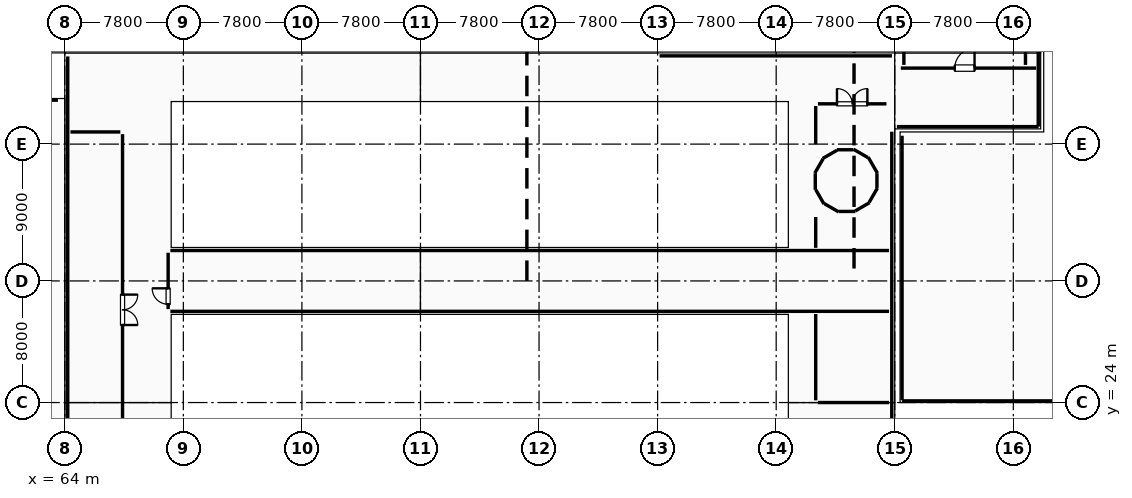
"""IFC4 building model, lengths in metres.
Left out: names, types, materials, properties, quantities, classifications, styles, units other than length and angle.
Written with IfcOpenShell. Run it as: python <this file> out.ifc"""

import sys

from ifc_helpers import new_model, si_unit, direction, frame, frame_2d, origin, origin_2d, place, context, subcontext, project, spatial, rectangle, i_section, extrude, element, fill, save


model = new_model("IFC4")
c1 = context("Model", 3, precision=1e-05, world=origin(), true_north=direction((0.0, 1.0)))
c2 = subcontext(c1, "Body", "Model", "MODEL_VIEW")
j1 = project(units=[si_unit("LENGTHUNIT", "METRE"), si_unit("PLANEANGLEUNIT", "RADIAN")], contexts=[c1])
p1 = place(None, origin())
s1 = spatial("IfcSite", under=j1, at=p1, CompositionType="ELEMENT")
p2 = place(p1, origin())
s2 = spatial("IfcBuilding", under=s1, at=p2, CompositionType="ELEMENT")
p3 = place(p2, frame((0.0, 0.0, 19.8)))
s3 = spatial("IfcBuildingStorey", under=s2, at=p3, CompositionType="ELEMENT", Elevation=19.8)
p4 = place(p3, frame((126.4, 41.0, 0.0), z_axis=(0.0, 0.0, 1.0), x_axis=(1.0, 0.0, 0.0)))
e1 = element("IfcColumn", 1, at=p4, inside=s3, PredefinedType="COLUMN", context=c2, shape_type="SweptSolid", body=[
    extrude(rectangle(XDim=0.75, YDim=0.75, at=origin_2d()), origin(), (0.0, 0.0, 1.0), 4.23),
])
for number, where, z_axis, x_axis in (
    (2, (64.0, 47.0, 0.0), (0.0, 0.0, 1.0), (1.0, 0.0, 0.0)),
    (3, (71.8, 47.0, 0.0), (0.0, 0.0, 1.0), (1.0, 0.0, 0.0)),
    (4, (79.6, 47.0, 0.0), (0.0, 0.0, 1.0), (1.0, 0.0, 0.0)),
    (5, (87.4, 47.0, 0.0), (0.0, 0.0, 1.0), (1.0, 0.0, 0.0)),
    (6, (95.2, 47.0, 0.0), (0.0, 0.0, 1.0), (1.0, 0.0, 0.0)),
    (7, (103.0, 47.0, 0.0), (0.0, 0.0, 1.0), (1.0, 0.0, 0.0)),
):
    element("IfcColumn", number, at=place(p3, frame(where, z_axis=z_axis, x_axis=x_axis)), inside=s3, PredefinedType="COLUMN", context=c2, shape_type="SweptSolid", body=[
        extrude(i_section(OverallWidth=0.25, OverallDepth=0.45, WebThickness=0.011, FlangeThickness=0.014, FilletRadius=0.015, at=origin_2d()), origin(), (0.0, 0.0, 1.0), 4.5),
    ])
p5 = place(p3, frame((70.0, 41.0, 0.0), z_axis=(0.0, 0.0, 1.0), x_axis=(1.0, 0.0, 0.0)))
e8 = element("IfcColumn", 8, at=p5, inside=s3, PredefinedType="COLUMN", context=c2, shape_type="SweptSolid", body=[
    extrude(rectangle(XDim=1.2, YDim=1.2, at=origin_2d()), origin(), (0.0, 0.0, 1.0), 4.5),
])
for number, where, z_axis, x_axis in (
    (9, (79.6, 41.0, 0.0), (0.0, 0.0, 1.0), (1.0, 0.0, 0.0)),
    (10, (87.4, 41.0, 0.0), (0.0, 0.0, 1.0), (1.0, 0.0, 0.0)),
    (11, (95.2, 41.0, 0.0), (0.0, 0.0, 1.0), (1.0, 0.0, 0.0)),
    (12, (103.0, 41.0, 0.0), (0.0, 0.0, 1.0), (1.0, 0.0, 0.0)),
):
    element("IfcColumn", number, at=place(p3, frame(where, z_axis=z_axis, x_axis=x_axis)), inside=s3, PredefinedType="COLUMN", context=c2, shape_type="SweptSolid", body=[
        extrude(rectangle(XDim=1.05, YDim=1.05, at=origin_2d()), origin(), (0.0, 0.0, 1.0), 4.5),
    ])
p6 = place(p3, frame((112.6, 41.0, 0.0), z_axis=(0.0, 0.0, 1.0), x_axis=(1.0, 0.0, 0.0)))
e13 = element("IfcColumn", 13, at=p6, inside=s3, PredefinedType="COLUMN", context=c2, shape_type="SweptSolid", body=[
    extrude(rectangle(XDim=1.2, YDim=1.2, at=origin_2d()), origin(), (0.0, 0.0, 1.0), 4.5),
])
p7 = place(p3, frame((103.129, 46.805, 0.0), z_axis=(0.0, 0.0, 1.0), x_axis=(1.0, 0.0, 0.0)))
e14 = element("IfcWall", 14, at=p7, inside=s3, PredefinedType="STANDARD", context=c2, shape_type="SweptSolid", body=[
    extrude(rectangle(XDim=15.286, YDim=0.35, at=frame_2d((7.643, 0.0))), origin(), (0.0, 0.0, 1.0), 1.25),
])
p8 = place(p3, frame((128.04, 55.25, 0.0), z_axis=(0.0, 0.0, 1.0), x_axis=(0.0, -1.0, 0.0)))
e15 = element("IfcWall", 15, at=p8, inside=s3, PredefinedType="STANDARD", context=c2, shape_type="SweptSolid", body=[
    extrude(rectangle(XDim=13.1, YDim=0.28, at=frame_2d((6.55, 0.0))), origin(), (0.0, 0.0, 1.0), 4.28),
])
p9 = place(p8, frame((5.5, 0.0, 0.95)))
e16 = element("IfcOpeningElement", 16, at=p9, cuts=e15, PredefinedType="OPENING", context=c2, shape_type="SweptSolid", body=[
    extrude(rectangle(XDim=2.1, YDim=1.5, at=frame_2d((1.05, 0.75))), frame((0.0, 0.15, 0.0), z_axis=(0.0, -1.0, 0.0), x_axis=(1.0, 0.0, 0.0)), (0.0, 0.0, 1.0), 0.3),
])
p10 = place(p3, frame((128.06, 42.15, 0.0), z_axis=(0.0, 0.0, 1.0), x_axis=(-1.0, 0.0, 0.0)))
e17 = element("IfcWall", 17, at=p10, inside=s3, PredefinedType="ELEMENTEDWALL", context=c2, shape_type="SweptSolid", body=[
    extrude(rectangle(XDim=9.32, YDim=0.26, at=frame_2d((4.66, 0.0))), origin(), (0.0, 0.0, 1.0), 4.28),
])
p11 = place(p10, frame((3.61, 0.0, 0.95)))
e18 = element("IfcOpeningElement", 18, at=p11, cuts=e17, PredefinedType="OPENING", context=c2, shape_type="SweptSolid", body=[
    extrude(rectangle(XDim=2.1, YDim=1.8, at=frame_2d((1.05, 0.9))), frame((0.0, 0.14, 0.0), z_axis=(0.0, -1.0, 0.0), x_axis=(1.0, 0.0, 0.0)), (0.0, 0.0, 1.0), 0.28),
])
p12 = place(p3, frame((118.405, 41.815, 0.0), z_axis=(0.0, 0.0, 1.0), x_axis=(0.0, -1.0, 0.0)))
e19 = element("IfcWall", 19, at=p12, inside=s3, PredefinedType="STANDARD", context=c2, shape_type="SweptSolid", body=[
    extrude(rectangle(XDim=31.63, YDim=0.35, at=frame_2d((15.815, 0.0))), origin(), (0.0, 0.0, 1.0), 1.25),
])
p13 = place(p3, frame((64.195, 10.185, 0.0), z_axis=(0.0, 0.0, 1.0), x_axis=(0.0, 1.0, 0.0)))
e20 = element("IfcWall", 20, at=p13, inside=s3, PredefinedType="STANDARD", context=c2, shape_type="SweptSolid", body=[
    extrude(rectangle(XDim=36.582, YDim=0.35, at=frame_2d((18.291, 0.0))), origin(), (0.0, 0.0, 1.0), 1.25),
])
p14 = place(p3, frame((63.876, 47.17, 0.0), z_axis=(0.0, 0.0, 1.0), x_axis=(-1.0, 0.0, 0.0)))
e21 = element("IfcWall", 21, at=p14, inside=s3, PredefinedType="STANDARD", context=c2, shape_type="SweptSolid", body=[
    extrude(rectangle(XDim=9.716, YDim=0.3, at=frame_2d((4.858, 0.0))), origin(), (0.0, 0.0, 1.0), 4.25),
])
p15 = place(p14, frame((3.826, 0.0, 0.95)))
e22 = element("IfcOpeningElement", 22, at=p15, cuts=e21, PredefinedType="OPENING", context=c2, shape_type="SweptSolid", body=[
    extrude(rectangle(XDim=2.1, YDim=2.1, at=frame_2d((1.05, 1.05))), frame((0.0, 0.16, 0.0), z_axis=(0.0, -1.0, 0.0), x_axis=(1.0, 0.0, 0.0)), (0.0, 0.0, 1.0), 0.32),
])
p16 = place(p3, frame((40.45, 43.89, 0.0), z_axis=(0.0, 0.0, 1.0), x_axis=(1.0, 0.0, 0.0)))
e23 = element("IfcWall", 23, at=p16, inside=s3, PredefinedType="PARAPET", context=c2, shape_type="SweptSolid", body=[
    extrude(rectangle(XDim=23.1, YDim=0.18, at=frame_2d((11.55, 0.0))), origin(), (0.0, 0.0, 1.0), 1.15),
])
p17 = place(p3, frame((135.2, 24.11, 0.0), z_axis=(0.0, 0.0, 1.0), x_axis=(-1.0, 0.0, 0.0)))
e24 = element("IfcWall", 24, at=p17, inside=s3, PredefinedType="PARAPET", context=c2, shape_type="SweptSolid", body=[
    extrude(rectangle(XDim=16.12, YDim=0.18, at=frame_2d((8.06, 0.0))), origin(), (0.0, 0.0, 1.0), 1.15),
])
p18 = place(p3, frame((119.08, 24.15, 0.0), z_axis=(0.0, 0.0, 1.0), x_axis=(0.0, 1.0, 0.0)))
e25 = element("IfcWall", 25, at=p18, inside=s3, PredefinedType="PARAPET", context=c2, shape_type="SweptSolid", body=[
    extrude(rectangle(XDim=17.4, YDim=0.22, at=frame_2d((8.7, 0.0))), origin(), (0.0, 0.0, 1.0), 1.15),
])
p19 = place(p3, frame((119.0, 46.0, 0.0), z_axis=(0.0, 0.0, 1.0), x_axis=(1.0, 0.0, 0.0)))
e26 = element("IfcWall", 26, at=p19, inside=s3, PredefinedType="SHEAR", context=c2, shape_type="SweptSolid", body=[
    extrude(rectangle(XDim=8.896, YDim=0.4, at=frame_2d((4.448, 0.0))), origin(), (0.0, 0.0, 1.0), 4.28),
])
p20 = place(p19, frame((3.55, 0.0, 0.0)))
e27 = element("IfcOpeningElement", 27, at=p20, cuts=e26, PredefinedType="OPENING", context=c2, shape_type="SweptSolid", body=[
    extrude(rectangle(XDim=1.3, YDim=2.15, at=frame_2d((0.65, 1.075))), frame((0.0, 0.21, 0.0), z_axis=(0.0, -1.0, 0.0), x_axis=(1.0, 0.0, 0.0)), (0.0, 0.0, 1.0), 0.42),
])
for number, where, z_axis, x_axis in (
    (28, (127.2, 46.21, 0.0), (0.0, 0.0, 1.0), (0.0, 1.0, 0.0)),
    (29, (119.2, 54.59, 0.0), (0.0, 0.0, 1.0), (0.0, -1.0, 0.0)),
):
    element("IfcWall", number, at=place(p3, frame(where, z_axis=z_axis, x_axis=x_axis)), inside=s3, PredefinedType="SHEAR", context=c2, shape_type="SweptSolid", body=[
        extrude(rectangle(XDim=8.38, YDim=0.4, at=frame_2d((4.19, 0.0))), origin(), (0.0, 0.0, 1.0), 4.28),
    ])
p21 = place(p3, frame((117.461, 39.086, 0.0), z_axis=(0.0, 0.0, 1.0), x_axis=(-0.500080723117, 0.865978793255, 0.0)))
e30 = element("IfcWall", 30, at=p21, inside=s3, PredefinedType="SHEAR", context=c2, shape_type="SweptSolid", body=[
    extrude(rectangle(XDim=1.219, YDim=0.35, at=frame_2d((0.609, 0.0))), origin(), (0.0, 0.0, 1.0), 4.5),
])
for number, where, z_axis, x_axis in (
    (31, (116.833, 40.115, 0.0), (0.0, 0.0, 1.0), (-0.866, 0.5, 0.0)),
    (32, (115.884, 40.628, 0.0), (0.0, 0.0, 1.0), (-1.0, 0.0, 0.0)),
    (33, (114.804, 40.598, 0.0), (0.0, 0.0, 1.0), (-0.866, -0.5, 0.0)),
    (34, (113.885, 40.033, 0.0), (0.0, 0.0, 1.0), (-0.5, -0.866, 0.0)),
    (35, (113.372, 39.083, 0.0), (0.0, 0.0, 1.0), (0.0, -1.0, 0.0)),
    (36, (113.402, 38.004, 0.0), (0.0, 0.0, 1.0), (0.5, -0.866, 0.0)),
    (37, (113.967, 37.085, 0.0), (0.0, 0.0, 1.0), (0.866, -0.5, 0.0)),
    (38, (114.917, 36.572, 0.0), (0.0, 0.0, 1.0), (1.0, 0.0, 0.0)),
    (39, (115.996, 36.602, 0.0), (0.0, 0.0, 1.0), (0.866, 0.5, 0.0)),
    (40, (116.915, 37.167, 0.0), (0.0, 0.0, 1.0), (0.5, 0.866, 0.0)),
):
    element("IfcWall", number, at=place(p3, frame(where, z_axis=z_axis, x_axis=x_axis)), inside=s3, PredefinedType="SHEAR", context=c2, shape_type="SweptSolid", body=[
        extrude(rectangle(XDim=1.093, YDim=0.35, at=frame_2d((0.546, 0.0))), origin(), (0.0, 0.0, 1.0), 4.5),
    ])
p22 = place(p3, frame((117.428, 38.116, 0.0), z_axis=(0.0, 0.0, 1.0), x_axis=(0.0, 1.0, 0.0)))
e41 = element("IfcWall", 41, at=p22, inside=s3, PredefinedType="SHEAR", context=c2, shape_type="SweptSolid", body=[
    extrude(rectangle(XDim=0.967, YDim=0.35, at=frame_2d((0.483, 0.0))), origin(), (0.0, 0.0, 1.0), 4.5),
])
for number, where, z_axis, x_axis in (
    (42, (70.945, 34.0, 0.0), (0.0, 0.0, 1.0), (1.0, 0.0, 0.0)),
    (43, (118.226, 30.0, 0.0), (0.0, 0.0, 1.0), (-1.0, 0.0, 0.0)),
):
    element("IfcWall", number, at=place(p3, frame(where, z_axis=z_axis, x_axis=x_axis)), inside=s3, PredefinedType="PARTITIONING", context=c2, shape_type="SweptSolid", body=[
        extrude(rectangle(XDim=47.281, YDim=0.25, at=frame_2d((23.641, 0.0))), origin(), (0.0, 0.0, 1.0), 4.5),
    ])
p23 = place(p3, frame((70.8, 30.145, 0.0), z_axis=(0.0, 0.0, 1.0), x_axis=(0.0, 1.0, 0.0)))
e44 = element("IfcWall", 44, at=p23, inside=s3, PredefinedType="PARTITIONING", context=c2, shape_type="SweptSolid", body=[
    extrude(rectangle(XDim=3.71, YDim=0.25, at=frame_2d((1.855, 0.0))), origin(), (0.0, 0.0, 1.0), 4.5),
])
p24 = place(p23, frame((0.319, 0.0, 0.0)))
e45 = element("IfcOpeningElement", 45, at=p24, cuts=e44, PredefinedType="OPENING", context=c2, shape_type="SweptSolid", body=[
    extrude(rectangle(XDim=1.05, YDim=2.15, at=frame_2d((0.525, 1.075))), frame((0.0, 0.135, 0.0), z_axis=(0.0, -1.0, 0.0), x_axis=(1.0, 0.0, 0.0)), (0.0, 0.0, 1.0), 0.27),
])
p25 = place(p3, frame((113.4, 40.995, 0.0), z_axis=(0.0, 0.0, 1.0), x_axis=(0.0, 1.0, 0.0)))
e46 = element("IfcWall", 46, at=p25, inside=s3, PredefinedType="PARTITIONING", context=c2, shape_type="SweptSolid", body=[
    extrude(rectangle(XDim=2.51, YDim=0.25, at=frame_2d((1.255, 0.0))), origin(), (0.0, 0.0, 1.0), 4.5),
])
p26 = place(p3, frame((113.545, 43.65, 0.0), z_axis=(0.0, 0.0, 1.0), x_axis=(1.0, 0.0, 0.0)))
e47 = element("IfcWall", 47, at=p26, inside=s3, PredefinedType="PARTITIONING", context=c2, shape_type="SweptSolid", body=[
    extrude(rectangle(XDim=4.51, YDim=0.25, at=frame_2d((2.255, 0.0))), origin(), (0.0, 0.0, 1.0), 4.5),
])
p27 = place(p26, frame((1.255, 0.0, 0.0)))
e48 = element("IfcOpeningElement", 48, at=p27, cuts=e47, PredefinedType="OPENING", context=c2, shape_type="SweptSolid", body=[
    extrude(rectangle(XDim=2.0, YDim=2.35, at=frame_2d((1.0, 1.175))), frame((0.0, 0.135, 0.0), z_axis=(0.0, -1.0, 0.0), x_axis=(1.0, 0.0, 0.0)), (0.0, 0.0, 1.0), 0.27),
])
p28 = place(p3, frame((118.226, 24.0, 0.0), z_axis=(0.0, 0.0, 1.0), x_axis=(-1.0, 0.0, 0.0)))
e49 = element("IfcWall", 49, at=p28, inside=s3, PredefinedType="PARTITIONING", context=c2, shape_type="SweptSolid", body=[
    extrude(rectangle(XDim=4.681, YDim=0.25, at=frame_2d((2.341, 0.0))), origin(), (0.0, 0.0, 1.0), 4.5),
])
p29 = place(p3, frame((113.4, 24.145, 0.0), z_axis=(0.0, 0.0, 1.0), x_axis=(0.0, 1.0, 0.0)))
e50 = element("IfcWall", 50, at=p29, inside=s3, PredefinedType="PARTITIONING", context=c2, shape_type="SweptSolid", body=[
    extrude(rectangle(XDim=5.68, YDim=0.25, at=frame_2d((2.84, 0.0))), origin(), (0.0, 0.0, 1.0), 4.5),
])
p30 = place(p3, frame((113.4, 34.175, 0.0), z_axis=(0.0, 0.0, 1.0), x_axis=(0.0, 1.0, 0.0)))
e51 = element("IfcWall", 51, at=p30, inside=s3, PredefinedType="PARTITIONING", context=c2, shape_type="SweptSolid", body=[
    extrude(rectangle(XDim=2.03, YDim=0.25, at=frame_2d((1.015, 0.0))), origin(), (0.0, 0.0, 1.0), 4.5),
])
p31 = place(p3, frame((64.374, 41.8, 0.0), z_axis=(0.0, 0.0, 1.0), x_axis=(1.0, 0.0, 0.0)))
e52 = element("IfcWall", 52, at=p31, inside=s3, PredefinedType="PARTITIONING", context=c2, shape_type="SweptSolid", body=[
    extrude(rectangle(XDim=3.281, YDim=0.25, at=frame_2d((1.641, 0.0))), origin(), (0.0, 0.0, 1.0), 4.5),
])
p32 = place(p3, frame((67.8, 41.655, 0.0), z_axis=(0.0, 0.0, 1.0), x_axis=(0.0, -1.0, 0.0)))
e53 = element("IfcWall", 53, at=p32, inside=s3, PredefinedType="PARTITIONING", context=c2, shape_type="SweptSolid", body=[
    extrude(rectangle(XDim=23.11, YDim=0.25, at=frame_2d((11.555, 0.0))), origin(), (0.0, 0.0, 1.0), 4.5),
])
p33 = place(p32, frame((10.555, 0.0, 0.0)))
e54 = element("IfcOpeningElement", 54, at=p33, cuts=e53, PredefinedType="OPENING", context=c2, shape_type="SweptSolid", body=[
    extrude(rectangle(XDim=2.0, YDim=2.35, at=frame_2d((1.0, 1.175))), frame((0.0, 0.135, 0.0), z_axis=(0.0, -1.0, 0.0), x_axis=(1.0, 0.0, 0.0)), (0.0, 0.0, 1.0), 0.27),
])
p34 = place(p11, origin())
e55 = element("IfcWindow", 55, at=p34, inside=s3, PartitioningType="SINGLE_PANEL", PredefinedType="LIGHTDOME", context=c2, shape_type="SweptSolid", body=[
    extrude(rectangle(XDim=2.1, YDim=1.8, at=frame_2d((1.05, 0.9))), frame((0.0, 0.03, 0.0), z_axis=(0.0, -1.0, 0.0), x_axis=(1.0, 0.0, 0.0)), (0.0, 0.0, 1.0), 0.06),
])
fill(e18, e55)
p35 = place(p20, origin())
e56 = element("IfcDoor", 56, at=p35, inside=s3, OperationType="SINGLE_SWING_RIGHT", PredefinedType="DOOR", context=c2, shape_type="SweptSolid", body=[
    extrude(rectangle(XDim=1.3, YDim=2.15, at=frame_2d((0.65, 1.075))), frame((0.0, 0.025, 0.0), z_axis=(0.0, -1.0, 0.0), x_axis=(1.0, 0.0, 0.0)), (0.0, 0.0, 1.0), 0.05),
])
fill(e27, e56)
p36 = place(p24, origin())
e57 = element("IfcDoor", 57, at=p36, inside=s3, OperationType="SINGLE_SWING_RIGHT", PredefinedType="DOOR", context=c2, shape_type="SweptSolid", body=[
    extrude(rectangle(XDim=1.05, YDim=2.15, at=frame_2d((0.525, 1.075))), frame((0.0, 0.025, 0.0), z_axis=(0.0, -1.0, 0.0), x_axis=(1.0, 0.0, 0.0)), (0.0, 0.0, 1.0), 0.05),
])
fill(e45, e57)
p37 = place(p27, origin())
e58 = element("IfcDoor", 58, at=p37, inside=s3, OperationType="DOUBLE_SWING_LEFT", PredefinedType="DOOR", context=c2, shape_type="SweptSolid", body=[
    extrude(rectangle(XDim=2.0, YDim=2.35, at=frame_2d((1.0, 1.175))), frame((0.0, 0.025, 0.0), z_axis=(0.0, -1.0, 0.0), x_axis=(1.0, 0.0, 0.0)), (0.0, 0.0, 1.0), 0.05),
])
fill(e48, e58)
p38 = place(p33, origin())
e59 = element("IfcDoor", 59, at=p38, inside=s3, OperationType="DOUBLE_SWING_LEFT", PredefinedType="DOOR", context=c2, shape_type="SweptSolid", body=[
    extrude(rectangle(XDim=2.0, YDim=2.35, at=frame_2d((1.0, 1.175))), frame((0.0, 0.025, 0.0), z_axis=(0.0, -1.0, 0.0), x_axis=(1.0, 0.0, 0.0)), (0.0, 0.0, 1.0), 0.05),
])
fill(e54, e59)
save(model, sys.argv[1])
